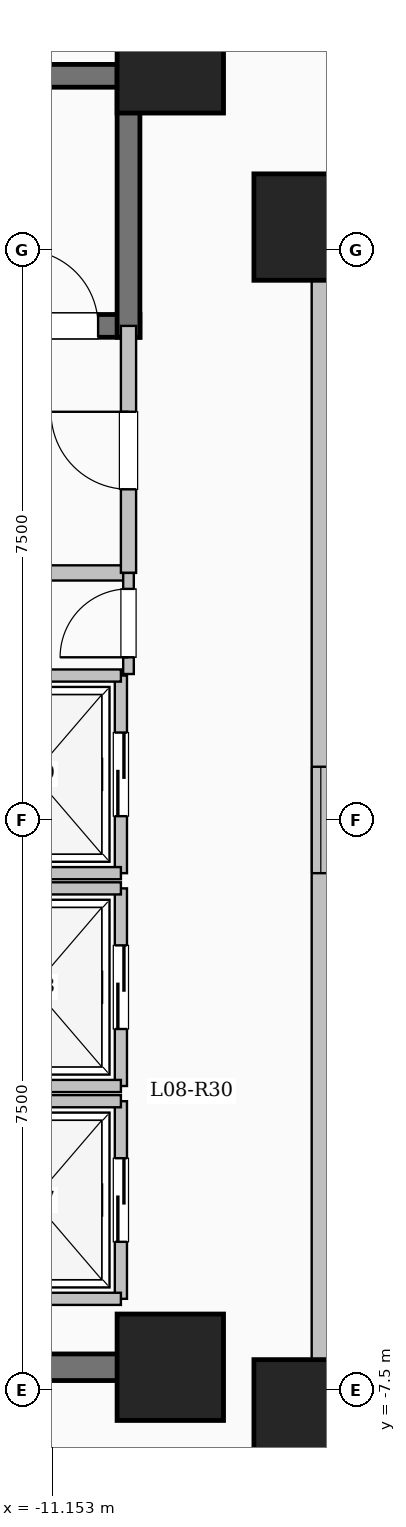
"""IFC4 building model, lengths in metres.
Left out: names, types, materials, properties, quantities, classifications, styles, units other than length and angle.
Written with IfcOpenShell. Run it as: python <this file> out.ifc"""

import sys

from ifc_helpers import new_model, si_unit, direction, frame, frame_2d, origin, origin_2d, place, context, subcontext, project, spatial, rectangle, extrude, element, fill, save


model = new_model("IFC4")
c1 = context("Model", 3, precision=1e-05, world=origin(), true_north=direction((0.0, 1.0)))
c2 = subcontext(c1, "Body", "Model", "MODEL_VIEW")
j1 = project(units=[si_unit("LENGTHUNIT", "METRE"), si_unit("PLANEANGLEUNIT", "RADIAN")], contexts=[c1])
p1 = place(None, origin())
s1 = spatial("IfcSite", under=j1, at=p1, CompositionType="ELEMENT")
p2 = place(p1, origin())
s2 = spatial("IfcBuilding", under=s1, at=p2, CompositionType="ELEMENT")
p3 = place(p2, frame((0.0, 0.0, 34.05)))
s3 = spatial("IfcBuildingStorey", under=s2, at=p3, CompositionType="ELEMENT", Elevation=34.05)
for number, where, z_axis, x_axis in (
    (1, (-7.8, -7.8, 0.0), (0.0, 0.0, 1.0), (1.0, 0.0, 0.0)),
    (2, (-7.8, 7.8, 0.0), (0.0, 0.0, 1.0), (1.0, 0.0, 0.0)),
    (3, (-9.6, -7.2, 0.0), (0.0, 0.0, 1.0), (1.0, 0.0, 0.0)),
    (4, (-9.6, 10.0, 0.0), (0.0, 0.0, 1.0), (1.0, 0.0, 0.0)),
):
    element("IfcColumn", number, at=place(p3, frame(where, z_axis=z_axis, x_axis=x_axis)), inside=s3, PredefinedType="COLUMN", context=c2, shape_type="SweptSolid", body=[
        extrude(rectangle(XDim=1.4, YDim=1.4, at=origin_2d()), origin(), (0.0, 0.0, 1.0), 3.35),
    ])
p4 = place(p3, frame((-7.62, -7.62, 0.0), z_axis=(0.0, 0.0, 1.0), x_axis=(1.0, 0.0, 0.0)))
e5 = element("IfcWall", 5, at=p4, inside=s3, PredefinedType="SOLIDWALL", context=c2, shape_type="SweptSolid", body=[
    extrude(rectangle(XDim=15.24, YDim=0.24, at=frame_2d((7.62, 0.0))), origin(), (0.0, 0.0, 1.0), 3.1),
])
p5 = place(p4, frame((6.92, 0.0, 0.95)))
e6 = element("IfcOpeningElement", 6, at=p5, cuts=e5, PredefinedType="OPENING", context=c2, shape_type="SweptSolid", body=[
    extrude(rectangle(XDim=1.4, YDim=1.5, at=frame_2d((0.7, 0.75))), frame((0.0, 0.13, 0.0), z_axis=(0.0, -1.0, 0.0), x_axis=(1.0, 0.0, 0.0)), (0.0, 0.0, 1.0), 0.26),
])
p6 = place(p3, frame((7.62, 7.62, 0.0), z_axis=(0.0, 0.0, 1.0), x_axis=(-1.0, 0.0, 0.0)))
e7 = element("IfcWall", 7, at=p6, inside=s3, PredefinedType="SOLIDWALL", context=c2, shape_type="SweptSolid", body=[
    extrude(rectangle(XDim=15.24, YDim=0.24, at=frame_2d((7.62, 0.0))), origin(), (0.0, 0.0, 1.0), 3.1),
])
p7 = place(p6, frame((6.92, 0.0, 0.95)))
e8 = element("IfcOpeningElement", 8, at=p7, cuts=e7, PredefinedType="OPENING", context=c2, shape_type="SweptSolid", body=[
    extrude(rectangle(XDim=1.4, YDim=1.5, at=frame_2d((0.7, 0.75))), frame((0.0, 0.13, 0.0), z_axis=(0.0, -1.0, 0.0), x_axis=(1.0, 0.0, 0.0)), (0.0, 0.0, 1.0), 0.26),
])
p8 = place(p3, frame((-7.62, 7.62, 0.0), z_axis=(0.0, 0.0, 1.0), x_axis=(0.0, -1.0, 0.0)))
e9 = element("IfcWall", 9, at=p8, inside=s3, PredefinedType="SOLIDWALL", context=c2, shape_type="SweptSolid", body=[
    extrude(rectangle(XDim=15.24, YDim=0.24, at=frame_2d((7.62, 0.0))), origin(), (0.0, 0.0, 1.0), 3.1),
])
p9 = place(p8, frame((6.92, 0.0, 0.95)))
e10 = element("IfcOpeningElement", 10, at=p9, cuts=e9, PredefinedType="OPENING", context=c2, shape_type="SweptSolid", body=[
    extrude(rectangle(XDim=1.4, YDim=1.5, at=frame_2d((0.7, 0.75))), frame((0.0, 0.13, 0.0), z_axis=(0.0, -1.0, 0.0), x_axis=(1.0, 0.0, 0.0)), (0.0, 0.0, 1.0), 0.26),
])
p10 = place(p3, frame((-18.0, 9.79, 0.0), z_axis=(0.0, 0.0, 1.0), x_axis=(1.0, 0.0, 0.0)))
e11 = element("IfcWall", 11, at=p10, inside=s3, PredefinedType="SHEAR", context=c2, shape_type="SweptSolid", body=[
    extrude(rectangle(XDim=8.0, YDim=0.3, at=frame_2d((4.0, 0.0))), origin(), (0.0, 0.0, 1.0), 3.35),
])
p11 = place(p3, frame((-18.0, 6.5, 0.0), z_axis=(0.0, 0.0, 1.0), x_axis=(1.0, 0.0, 0.0)))
e12 = element("IfcWall", 12, at=p11, inside=s3, PredefinedType="SHEAR", context=c2, shape_type="SweptSolid", body=[
    extrude(rectangle(XDim=8.0, YDim=0.3, at=frame_2d((4.0, 0.0))), origin(), (0.0, 0.0, 1.0), 3.35),
])
p12 = place(p11, frame((6.45, 0.0, 0.0)))
e13 = element("IfcOpeningElement", 13, at=p12, cuts=e12, PredefinedType="OPENING", context=c2, shape_type="SweptSolid", body=[
    extrude(rectangle(XDim=1.0, YDim=2.15, at=frame_2d((0.5, 1.075))), frame((0.0, 0.16, 0.0), z_axis=(0.0, -1.0, 0.0), x_axis=(1.0, 0.0, 0.0)), (0.0, 0.0, 1.0), 0.32),
])
p13 = place(p3, frame((-10.15, 6.35, 0.0), z_axis=(0.0, 0.0, 1.0), x_axis=(0.0, 1.0, 0.0)))
e14 = element("IfcWall", 14, at=p13, inside=s3, PredefinedType="SHEAR", context=c2, shape_type="SweptSolid", body=[
    extrude(rectangle(XDim=3.59, YDim=0.3, at=frame_2d((1.795, 0.0))), origin(), (0.0, 0.0, 1.0), 3.35),
])
p14 = place(p3, frame((-15.55, 3.25, 0.0), z_axis=(0.0, 0.0, 1.0), x_axis=(1.0, 0.0, 0.0)))
e15 = element("IfcWall", 15, at=p14, inside=s3, PredefinedType="SOLIDWALL", context=c2, shape_type="SweptSolid", body=[
    extrude(rectangle(XDim=5.4, YDim=0.2, at=frame_2d((2.7, 0.0))), origin(), (0.0, 0.0, 1.0), 3.1),
])
p15 = place(p3, frame((-10.15, 3.25, 0.0), z_axis=(0.0, 0.0, 1.0), x_axis=(0.0, 1.0, 0.0)))
e16 = element("IfcWall", 16, at=p15, inside=s3, PredefinedType="SOLIDWALL", context=c2, shape_type="SweptSolid", body=[
    extrude(rectangle(XDim=3.25, YDim=0.2, at=frame_2d((1.625, 0.0))), origin(), (0.0, 0.0, 1.0), 3.1),
])
p16 = place(p15, frame((1.1, 0.0, 0.0)))
e17 = element("IfcOpeningElement", 17, at=p16, cuts=e16, PredefinedType="OPENING", context=c2, shape_type="SweptSolid", body=[
    extrude(rectangle(XDim=1.02, YDim=2.15, at=frame_2d((0.51, 1.075))), frame((0.0, 0.11, 0.0), z_axis=(0.0, -1.0, 0.0), x_axis=(1.0, 0.0, 0.0)), (0.0, 0.0, 1.0), 0.22),
])
p17 = place(p3, frame((-10.25, -6.3, 0.0), z_axis=(0.0, 0.0, 1.0), x_axis=(0.0, 1.0, 0.0)))
e18 = element("IfcWall", 18, at=p17, inside=s3, PredefinedType="SOLIDWALL", context=c2, shape_type="SweptSolid", body=[
    extrude(rectangle(XDim=2.6, YDim=0.16, at=frame_2d((1.3, 0.0))), origin(), (0.0, 0.0, 1.0), 3.1),
])
p18 = place(p17, frame((0.75, 0.0, 0.0)))
e19 = element("IfcOpeningElement", 19, at=p18, cuts=e18, PredefinedType="OPENING", context=c2, shape_type="SweptSolid", body=[
    extrude(rectangle(XDim=1.1, YDim=2.15, at=frame_2d((0.55, 1.075))), frame((0.0, 0.09, 0.0), z_axis=(0.0, -1.0, 0.0), x_axis=(1.0, 0.0, 0.0)), (0.0, 0.0, 1.0), 0.18),
])
for number, where, z_axis, x_axis in (
    (20, (-12.55, -6.3, 0.0), (0.0, 0.0, 1.0), (1.0, 0.0, 0.0)),
    (21, (-12.55, -3.7, 0.0), (0.0, 0.0, 1.0), (1.0, 0.0, 0.0)),
):
    element("IfcWall", number, at=place(p3, frame(where, z_axis=z_axis, x_axis=x_axis)), inside=s3, PredefinedType="SOLIDWALL", context=c2, shape_type="SweptSolid", body=[
        extrude(rectangle(XDim=2.3, YDim=0.16, at=frame_2d((1.15, 0.0))), origin(), (0.0, 0.0, 1.0), 3.1),
    ])
p19 = place(p3, frame((-10.25, -3.5, 0.0), z_axis=(0.0, 0.0, 1.0), x_axis=(0.0, 1.0, 0.0)))
e22 = element("IfcWall", 22, at=p19, inside=s3, PredefinedType="SOLIDWALL", context=c2, shape_type="SweptSolid", body=[
    extrude(rectangle(XDim=2.6, YDim=0.16, at=frame_2d((1.3, 0.0))), origin(), (0.0, 0.0, 1.0), 3.1),
])
p20 = place(p19, frame((0.75, 0.0, 0.0)))
e23 = element("IfcOpeningElement", 23, at=p20, cuts=e22, PredefinedType="OPENING", context=c2, shape_type="SweptSolid", body=[
    extrude(rectangle(XDim=1.1, YDim=2.15, at=frame_2d((0.55, 1.075))), frame((0.0, 0.09, 0.0), z_axis=(0.0, -1.0, 0.0), x_axis=(1.0, 0.0, 0.0)), (0.0, 0.0, 1.0), 0.18),
])
for number, where, z_axis, x_axis in (
    (24, (-12.55, -3.5, 0.0), (0.0, 0.0, 1.0), (1.0, 0.0, 0.0)),
    (25, (-12.55, -0.9, 0.0), (0.0, 0.0, 1.0), (1.0, 0.0, 0.0)),
):
    element("IfcWall", number, at=place(p3, frame(where, z_axis=z_axis, x_axis=x_axis)), inside=s3, PredefinedType="SOLIDWALL", context=c2, shape_type="SweptSolid", body=[
        extrude(rectangle(XDim=2.3, YDim=0.16, at=frame_2d((1.15, 0.0))), origin(), (0.0, 0.0, 1.0), 3.1),
    ])
p21 = place(p3, frame((-10.25, -0.7, 0.0), z_axis=(0.0, 0.0, 1.0), x_axis=(0.0, 1.0, 0.0)))
e26 = element("IfcWall", 26, at=p21, inside=s3, PredefinedType="SOLIDWALL", context=c2, shape_type="SweptSolid", body=[
    extrude(rectangle(XDim=2.6, YDim=0.16, at=frame_2d((1.3, 0.0))), origin(), (0.0, 0.0, 1.0), 3.1),
])
p22 = place(p21, frame((0.75, 0.0, 0.0)))
e27 = element("IfcOpeningElement", 27, at=p22, cuts=e26, PredefinedType="OPENING", context=c2, shape_type="SweptSolid", body=[
    extrude(rectangle(XDim=1.1, YDim=2.15, at=frame_2d((0.55, 1.075))), frame((0.0, 0.09, 0.0), z_axis=(0.0, -1.0, 0.0), x_axis=(1.0, 0.0, 0.0)), (0.0, 0.0, 1.0), 0.18),
])
for number, where, z_axis, x_axis in (
    (28, (-12.55, -0.7, 0.0), (0.0, 0.0, 1.0), (1.0, 0.0, 0.0)),
    (29, (-12.55, 1.9, 0.0), (0.0, 0.0, 1.0), (1.0, 0.0, 0.0)),
):
    element("IfcWall", number, at=place(p3, frame(where, z_axis=z_axis, x_axis=x_axis)), inside=s3, PredefinedType="SOLIDWALL", context=c2, shape_type="SweptSolid", body=[
        extrude(rectangle(XDim=2.3, YDim=0.16, at=frame_2d((1.15, 0.0))), origin(), (0.0, 0.0, 1.0), 3.1),
    ])
p23 = place(p3, frame((-18.625, -7.2, 0.0), z_axis=(0.0, 0.0, 1.0), x_axis=(1.0, 0.0, 0.0)))
e30 = element("IfcWall", 30, at=p23, inside=s3, PredefinedType="SHEAR", context=c2, shape_type="SweptSolid", body=[
    extrude(rectangle(XDim=8.55, YDim=0.35, at=frame_2d((4.275, 0.0))), origin(), (0.0, 0.0, 1.0), 3.35),
])
p24 = place(p3, frame((-10.15, 1.92, 0.0), z_axis=(0.0, 0.0, 1.0), x_axis=(0.0, 1.0, 0.0)))
e31 = element("IfcWall", 31, at=p24, inside=s3, PredefinedType="PARTITIONING", context=c2, shape_type="SweptSolid", body=[
    extrude(rectangle(XDim=1.33, YDim=0.14, at=frame_2d((0.665, 0.0))), origin(), (0.0, 0.0, 1.0), 3.1),
])
p25 = place(p24, frame((0.22, 0.0, 0.0)))
e32 = element("IfcOpeningElement", 32, at=p25, cuts=e31, PredefinedType="OPENING", context=c2, shape_type="SweptSolid", body=[
    extrude(rectangle(XDim=0.9, YDim=2.08, at=frame_2d((0.45, 1.04))), frame((0.0, 0.08, 0.0), z_axis=(0.0, -1.0, 0.0), x_axis=(1.0, 0.0, 0.0)), (0.0, 0.0, 1.0), 0.16),
])
p26 = place(p9, origin())
e33 = element("IfcWindow", 33, at=p26, inside=s3, PartitioningType="SINGLE_PANEL", PredefinedType="WINDOW", context=c2, shape_type="SweptSolid", body=[
    extrude(rectangle(XDim=1.4, YDim=1.5, at=frame_2d((0.7, 0.75))), frame((0.0, 0.03, 0.0), z_axis=(0.0, -1.0, 0.0), x_axis=(1.0, 0.0, 0.0)), (0.0, 0.0, 1.0), 0.06),
])
fill(e10, e33)
p27 = place(p12, origin())
e34 = element("IfcDoor", 34, at=p27, inside=s3, OperationType="SINGLE_SWING_LEFT", PredefinedType="DOOR", context=c2, shape_type="SweptSolid", body=[
    extrude(rectangle(XDim=1.0, YDim=2.15, at=frame_2d((0.5, 1.075))), frame((0.0, 0.025, 0.0), z_axis=(0.0, -1.0, 0.0), x_axis=(1.0, 0.0, 0.0)), (0.0, 0.0, 1.0), 0.05),
])
fill(e13, e34)
p28 = place(p16, origin())
e35 = element("IfcDoor", 35, at=p28, inside=s3, OperationType="SINGLE_SWING_RIGHT", PredefinedType="DOOR", context=c2, shape_type="SweptSolid", body=[
    extrude(rectangle(XDim=1.02, YDim=2.15, at=frame_2d((0.51, 1.075))), frame((0.0, 0.025, 0.0), z_axis=(0.0, -1.0, 0.0), x_axis=(1.0, 0.0, 0.0)), (0.0, 0.0, 1.0), 0.05),
])
fill(e17, e35)
p29 = place(p18, origin())
e36 = element("IfcDoor", 36, at=p29, inside=s3, OperationType="SLIDING_TO_LEFT", PredefinedType="DOOR", context=c2, shape_type="SweptSolid", body=[
    extrude(rectangle(XDim=1.1, YDim=2.15, at=frame_2d((0.55, 1.075))), frame((0.0, 0.025, 0.0), z_axis=(0.0, -1.0, 0.0), x_axis=(1.0, 0.0, 0.0)), (0.0, 0.0, 1.0), 0.05),
])
fill(e19, e36)
p30 = place(p20, origin())
e37 = element("IfcDoor", 37, at=p30, inside=s3, OperationType="SLIDING_TO_LEFT", PredefinedType="DOOR", context=c2, shape_type="SweptSolid", body=[
    extrude(rectangle(XDim=1.1, YDim=2.15, at=frame_2d((0.55, 1.075))), frame((0.0, 0.025, 0.0), z_axis=(0.0, -1.0, 0.0), x_axis=(1.0, 0.0, 0.0)), (0.0, 0.0, 1.0), 0.05),
])
fill(e23, e37)
p31 = place(p22, origin())
e38 = element("IfcDoor", 38, at=p31, inside=s3, OperationType="SLIDING_TO_LEFT", PredefinedType="DOOR", context=c2, shape_type="SweptSolid", body=[
    extrude(rectangle(XDim=1.1, YDim=2.15, at=frame_2d((0.55, 1.075))), frame((0.0, 0.025, 0.0), z_axis=(0.0, -1.0, 0.0), x_axis=(1.0, 0.0, 0.0)), (0.0, 0.0, 1.0), 0.05),
])
fill(e27, e38)
p32 = place(p25, origin())
e39 = element("IfcDoor", 39, at=p32, inside=s3, OperationType="SINGLE_SWING_LEFT", PredefinedType="DOOR", context=c2, shape_type="SweptSolid", body=[
    extrude(rectangle(XDim=0.9, YDim=2.08, at=frame_2d((0.45, 1.04))), frame((0.0, 0.025, 0.0), z_axis=(0.0, -1.0, 0.0), x_axis=(1.0, 0.0, 0.0)), (0.0, 0.0, 1.0), 0.05),
])
fill(e32, e39)
save(model, sys.argv[1])
